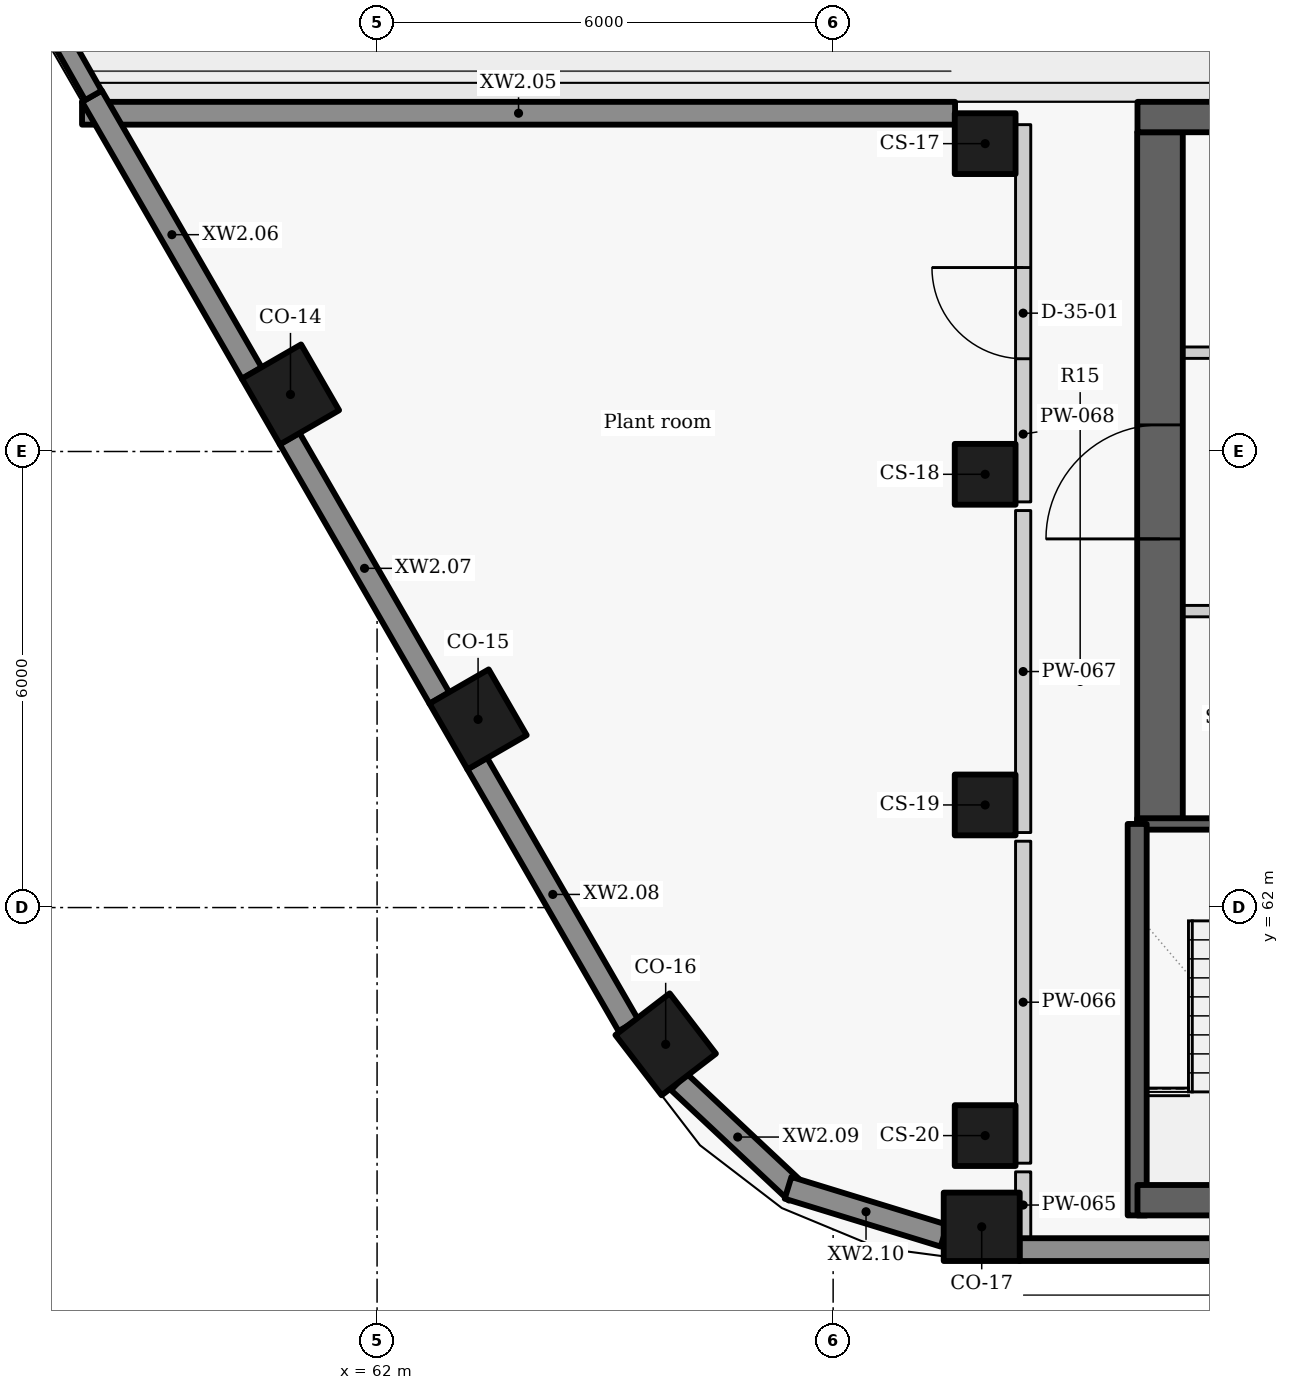
"""IFC4 building model, lengths in metres.
Left out: names, types, materials, properties, quantities, classifications, styles, units other than length and angle.
Written with IfcOpenShell. Run it as: python <this file> out.ifc"""

import sys

from ifc_helpers import new_model, si_unit, direction, frame, frame_2d, origin, origin_2d, place, context, subcontext, project, spatial, rectangle, extrude, element, fill, save


model = new_model("IFC4")
c1 = context("Model", 3, precision=1e-05, world=origin(), true_north=direction((0.0, 1.0)))
c2 = subcontext(c1, "Body", "Model", "MODEL_VIEW")
j1 = project(units=[si_unit("LENGTHUNIT", "METRE"), si_unit("PLANEANGLEUNIT", "RADIAN")], contexts=[c1])
p1 = place(None, origin())
s1 = spatial("IfcSite", under=j1, at=p1, CompositionType="ELEMENT")
p2 = place(p1, origin())
s2 = spatial("IfcBuilding", under=s1, at=p2, CompositionType="ELEMENT")
p3 = place(p2, frame((0.0, 0.0, 276.0)))
s3 = spatial("IfcBuildingStorey", under=s2, at=p3, CompositionType="ELEMENT", Elevation=276.0)
for number, where, z_axis, x_axis in (
    (1, (60.861, 68.75, 0.0), (0.0, 0.0, 1.0), (0.5, -0.866, 0.0)),
    (2, (63.329, 64.475, 0.0), (0.0, 0.0, 1.0), (0.5, -0.866, 0.0)),
    (3, (65.797, 60.2, 0.0), (0.0, 0.0, 1.0), (0.609, -0.793, 0.0)),
    (4, (69.955, 57.8, 0.0), (0.0, 0.0, 1.0), (1.0, 0.0, 0.0)),
):
    element("IfcColumn", number, at=place(p3, frame(where, z_axis=z_axis, x_axis=x_axis)), inside=s3, PredefinedType="COLUMN", context=c2, shape_type="SweptSolid", body=[
        extrude(rectangle(XDim=1.0, YDim=0.9, at=origin_2d()), origin(), (0.0, 0.0, 1.0), 3.6),
    ])
for number, where, z_axis, x_axis in (
    (5, (70.0, 72.05, 0.0), (0.0, 0.0, 1.0), (0.0, -1.0, 0.0)),
    (6, (70.0, 67.7, 0.0), (0.0, 0.0, 1.0), (0.0, -1.0, 0.0)),
    (7, (70.0, 63.35, 0.0), (0.0, 0.0, 1.0), (0.0, -1.0, 0.0)),
    (8, (70.0, 59.0, 0.0), (0.0, 0.0, 1.0), (0.0, -1.0, 0.0)),
):
    element("IfcColumn", number, at=place(p3, frame(where, z_axis=z_axis, x_axis=x_axis)), inside=s3, PredefinedType="COLUMN", context=c2, shape_type="SweptSolid", body=[
        extrude(rectangle(XDim=0.8, YDim=0.8, at=origin_2d()), origin(), (0.0, 0.0, 1.0), 3.6),
    ])
p4 = place(p3, frame((69.604, 72.45, 0.0), z_axis=(0.0, 0.0, 1.0), x_axis=(-1.0, 0.0, 0.0)))
e9 = element("IfcWall", 9, at=p4, inside=s3, PredefinedType="SOLIDWALL", context=c2, shape_type="SweptSolid", body=[
    extrude(rectangle(XDim=11.486, YDim=0.3, at=frame_2d((5.743, 0.0))), origin(), (0.0, 0.0, 1.0), 2.725),
])
p5 = place(p3, frame((58.248, 72.675, 0.0), z_axis=(0.0, 0.0, 1.0), x_axis=(0.499981865284, -0.866035873614, 0.0)))
e10 = element("IfcWall", 10, at=p5, inside=s3, PredefinedType="SOLIDWALL", context=c2, shape_type="SweptSolid", body=[
    extrude(rectangle(XDim=4.209, YDim=0.3, at=frame_2d((2.104, 0.0))), origin(), (0.0, 0.0, 1.0), 2.725),
])
p6 = place(p3, frame((60.849, 68.171, 0.0), z_axis=(0.0, 0.0, 1.0), x_axis=(0.499986771468, -0.866033041146, 0.0)))
e11 = element("IfcWall", 11, at=p6, inside=s3, PredefinedType="SOLIDWALL", context=c2, shape_type="SweptSolid", body=[
    extrude(rectangle(XDim=3.944, YDim=0.3, at=frame_2d((1.972, 0.0))), origin(), (0.0, 0.0, 1.0), 2.725),
])
p7 = place(p3, frame((63.317, 63.896, 0.0), z_axis=(0.0, 0.0, 1.0), x_axis=(0.500005687176, -0.866022120267, 0.0)))
e12 = element("IfcWall", 12, at=p7, inside=s3, PredefinedType="SOLIDWALL", context=c2, shape_type="SweptSolid", body=[
    extrude(rectangle(XDim=3.979, YDim=0.3, at=frame_2d((1.99, 0.0))), origin(), (0.0, 0.0, 1.0), 2.725),
])
p8 = place(p3, frame((65.97, 59.708, 0.0), z_axis=(0.0, 0.0, 1.0), x_axis=(0.72926487109, -0.684231501609, 0.0)))
e13 = element("IfcWall", 13, at=p8, inside=s3, PredefinedType="SOLIDWALL", context=c2, shape_type="SweptSolid", body=[
    extrude(rectangle(XDim=2.125, YDim=0.3, at=frame_2d((1.062, 0.0))), origin(), (0.0, 0.0, 1.0), 2.725),
])
p9 = place(p3, frame((67.407, 58.313, 0.0), z_axis=(0.0, 0.0, 1.0), x_axis=(0.955955937739, -0.293510212944, 0.0)))
e14 = element("IfcWall", 14, at=p9, inside=s3, PredefinedType="SOLIDWALL", context=c2, shape_type="SweptSolid", body=[
    extrude(rectangle(XDim=2.146, YDim=0.3, at=frame_2d((1.073, 0.0))), origin(), (0.0, 0.0, 1.0), 2.725),
])
p10 = place(p3, frame((70.451, 57.5, 0.0), z_axis=(0.0, 0.0, 1.0), x_axis=(1.0, 0.0, 0.0)))
e15 = element("IfcWall", 15, at=p10, inside=s3, PredefinedType="SOLIDWALL", context=c2, shape_type="SweptSolid", body=[
    extrude(rectangle(XDim=19.093, YDim=0.3, at=frame_2d((9.546, 0.0))), origin(), (0.0, 0.0, 1.0), 2.725),
])
p11 = place(p3, frame((55.351, 77.834, 0.0), z_axis=(0.0, 0.0, 1.0), x_axis=(0.492736734633, -0.870178435922, 0.0)))
e16 = element("IfcWall", 16, at=p11, inside=s3, PredefinedType="PARAPET", context=c2, shape_type="SweptSolid", body=[
    extrude(rectangle(XDim=5.918, YDim=0.25, at=frame_2d((2.959, 0.0))), origin(), (0.0, 0.0, 1.0), 1.1),
])
p12 = place(p3, frame((72.0, 69.3, 0.0), z_axis=(0.0, 0.0, 1.0), x_axis=(1.0, 0.0, 0.0)))
e17 = element("IfcWall", 17, at=p12, inside=s3, PredefinedType="PARTITIONING", context=c2, shape_type="SweptSolid", body=[
    extrude(rectangle(XDim=13.4, YDim=0.15, at=frame_2d((6.7, 0.0))), origin(), (0.0, 0.0, 1.0), 3.325),
])
p13 = place(p12, frame((1.175, 0.0, 0.0)))
e18 = element("IfcOpeningElement", 18, at=p13, cuts=e17, PredefinedType="OPENING", context=c2, shape_type="SweptSolid", body=[
    extrude(rectangle(XDim=0.9, YDim=2.1, at=frame_2d((0.45, 1.05))), frame((0.0, 0.085, 0.0), z_axis=(0.0, -1.0, 0.0), x_axis=(1.0, 0.0, 0.0)), (0.0, 0.0, 1.0), 0.17),
])
p14 = place(p12, frame((3.5, 0.0, 0.0)))
e19 = element("IfcOpeningElement", 19, at=p14, cuts=e17, PredefinedType="OPENING", context=c2, shape_type="SweptSolid", body=[
    extrude(rectangle(XDim=0.9, YDim=2.1, at=frame_2d((0.45, 1.05))), frame((0.0, 0.085, 0.0), z_axis=(0.0, -1.0, 0.0), x_axis=(1.0, 0.0, 0.0)), (0.0, 0.0, 1.0), 0.17),
])
p15 = place(p12, frame((6.2, 0.0, 0.0)))
e20 = element("IfcOpeningElement", 20, at=p15, cuts=e17, PredefinedType="OPENING", context=c2, shape_type="SweptSolid", body=[
    extrude(rectangle(XDim=0.9, YDim=2.1, at=frame_2d((0.45, 1.05))), frame((0.0, 0.085, 0.0), z_axis=(0.0, -1.0, 0.0), x_axis=(1.0, 0.0, 0.0)), (0.0, 0.0, 1.0), 0.17),
])
p16 = place(p12, frame((8.9, 0.0, 0.0)))
e21 = element("IfcOpeningElement", 21, at=p16, cuts=e17, PredefinedType="OPENING", context=c2, shape_type="SweptSolid", body=[
    extrude(rectangle(XDim=0.9, YDim=2.1, at=frame_2d((0.45, 1.05))), frame((0.0, 0.085, 0.0), z_axis=(0.0, -1.0, 0.0), x_axis=(1.0, 0.0, 0.0)), (0.0, 0.0, 1.0), 0.17),
])
p17 = place(p12, frame((11.6, 0.0, 0.0)))
e22 = element("IfcOpeningElement", 22, at=p17, cuts=e17, PredefinedType="OPENING", context=c2, shape_type="SweptSolid", body=[
    extrude(rectangle(XDim=0.9, YDim=2.1, at=frame_2d((0.45, 1.05))), frame((0.0, 0.085, 0.0), z_axis=(0.0, -1.0, 0.0), x_axis=(1.0, 0.0, 0.0)), (0.0, 0.0, 1.0), 0.17),
])
p18 = place(p3, frame((72.3, 63.1, -0.275), z_axis=(0.0, 0.0, 1.0), x_axis=(0.0, 1.0, 0.0)))
e23 = element("IfcWall", 23, at=p18, inside=s3, PredefinedType="SHEAR", context=c2, shape_type="SweptSolid", body=[
    extrude(rectangle(XDim=9.1, YDim=0.6, at=frame_2d((4.55, 0.0))), origin(), (0.0, 0.0, 1.0), 3.6),
])
p19 = place(p18, frame((3.75, 0.0, 0.275)))
e24 = element("IfcOpeningElement", 24, at=p19, cuts=e23, PredefinedType="OPENING", context=c2, shape_type="SweptSolid", body=[
    extrude(rectangle(XDim=1.5, YDim=2.1, at=frame_2d((0.75, 1.05))), frame((0.0, 0.31, 0.0), z_axis=(0.0, -1.0, 0.0), x_axis=(1.0, 0.0, 0.0)), (0.0, 0.0, 1.0), 0.62),
])
p20 = place(p3, frame((82.703, 65.9, 0.0), z_axis=(0.0, 0.0, 1.0), x_axis=(-1.0, 0.0, 0.0)))
e25 = element("IfcWall", 25, at=p20, inside=s3, PredefinedType="PARTITIONING", context=c2, shape_type="SweptSolid", body=[
    extrude(rectangle(XDim=10.703, YDim=0.15, at=frame_2d((5.352, 0.0))), origin(), (0.0, 0.0, 1.0), 3.325),
])
p21 = place(p20, frame((8.528, 0.0, 0.0)))
e26 = element("IfcOpeningElement", 26, at=p21, cuts=e25, PredefinedType="OPENING", context=c2, shape_type="SweptSolid", body=[
    extrude(rectangle(XDim=1.1, YDim=2.1, at=frame_2d((0.55, 1.05))), frame((0.0, 0.085, 0.0), z_axis=(0.0, -1.0, 0.0), x_axis=(1.0, 0.0, 0.0)), (0.0, 0.0, 1.0), 0.17),
])
p22 = place(p20, frame((6.303, 0.0, 0.0)))
e27 = element("IfcOpeningElement", 27, at=p22, cuts=e25, PredefinedType="OPENING", context=c2, shape_type="SweptSolid", body=[
    extrude(rectangle(XDim=0.9, YDim=2.1, at=frame_2d((0.45, 1.05))), frame((0.0, 0.085, 0.0), z_axis=(0.0, -1.0, 0.0), x_axis=(1.0, 0.0, 0.0)), (0.0, 0.0, 1.0), 0.17),
])
p23 = place(p20, frame((3.453, 0.0, 0.0)))
e28 = element("IfcOpeningElement", 28, at=p23, cuts=e25, PredefinedType="OPENING", context=c2, shape_type="SweptSolid", body=[
    extrude(rectangle(XDim=1.2, YDim=2.1, at=frame_2d((0.6, 1.05))), frame((0.0, 0.085, 0.0), z_axis=(0.0, -1.0, 0.0), x_axis=(1.0, 0.0, 0.0)), (0.0, 0.0, 1.0), 0.17),
])
p24 = place(p20, frame((0.903, 0.0, 0.0)))
e29 = element("IfcOpeningElement", 29, at=p24, cuts=e25, PredefinedType="OPENING", context=c2, shape_type="SweptSolid", body=[
    extrude(rectangle(XDim=0.9, YDim=2.1, at=frame_2d((0.45, 1.05))), frame((0.0, 0.085, 0.0), z_axis=(0.0, -1.0, 0.0), x_axis=(1.0, 0.0, 0.0)), (0.0, 0.0, 1.0), 0.17),
])
p25 = place(p3, frame((72.0, 63.1, -0.275), z_axis=(0.0, 0.0, 1.0), x_axis=(1.0, 0.0, 0.0)))
e30 = element("IfcWall", 30, at=p25, inside=s3, PredefinedType="SHEAR", context=c2, shape_type="SweptSolid", body=[
    extrude(rectangle(XDim=2.6, YDim=0.15, at=frame_2d((1.3, 0.0))), origin(), (0.0, 0.0, 1.0), 3.6),
])
p26 = place(p25, frame((1.02, 0.0, 0.275)))
e31 = element("IfcOpeningElement", 31, at=p26, cuts=e30, PredefinedType="OPENING", context=c2, shape_type="SweptSolid", body=[
    extrude(rectangle(XDim=1.1, YDim=2.1, at=frame_2d((0.55, 1.05))), frame((0.0, 0.085, 0.0), z_axis=(0.0, -1.0, 0.0), x_axis=(1.0, 0.0, 0.0)), (0.0, 0.0, 1.0), 0.17),
])
p27 = place(p3, frame((72.0, 57.95, -0.275), z_axis=(0.0, 0.0, 1.0), x_axis=(0.0, 1.0, 0.0)))
e32 = element("IfcWall", 32, at=p27, inside=s3, PredefinedType="SHEAR", context=c2, shape_type="SweptSolid", body=[
    extrude(rectangle(XDim=5.15, YDim=0.25, at=frame_2d((2.575, 0.0))), origin(), (0.0, 0.0, 1.0), 3.6),
])
p28 = place(p3, frame((70.5, 57.65, 0.0), z_axis=(0.0, 0.0, 1.0), x_axis=(0.0, 1.0, 0.0)))
e33 = element("IfcWall", 33, at=p28, inside=s3, PredefinedType="PARTITIONING", context=c2, shape_type="SweptSolid", body=[
    extrude(rectangle(XDim=0.873, YDim=0.2, at=frame_2d((0.437, 0.0))), origin(), (0.0, 0.0, 1.0), 3.325),
])
p29 = place(p3, frame((70.5, 58.637, 0.0), z_axis=(0.0, 0.0, 1.0), x_axis=(0.0, 1.0, 0.0)))
e34 = element("IfcWall", 34, at=p29, inside=s3, PredefinedType="PARTITIONING", context=c2, shape_type="SweptSolid", body=[
    extrude(rectangle(XDim=4.236, YDim=0.2, at=frame_2d((2.118, 0.0))), origin(), (0.0, 0.0, 1.0), 3.325),
])
p30 = place(p3, frame((70.5, 62.987, 0.0), z_axis=(0.0, 0.0, 1.0), x_axis=(0.0, 1.0, 0.0)))
e35 = element("IfcWall", 35, at=p30, inside=s3, PredefinedType="PARTITIONING", context=c2, shape_type="SweptSolid", body=[
    extrude(rectangle(XDim=4.236, YDim=0.2, at=frame_2d((2.118, 0.0))), origin(), (0.0, 0.0, 1.0), 3.325),
])
p31 = place(p3, frame((70.5, 67.337, 0.0), z_axis=(0.0, 0.0, 1.0), x_axis=(0.0, 1.0, 0.0)))
e36 = element("IfcWall", 36, at=p31, inside=s3, PredefinedType="PARTITIONING", context=c2, shape_type="SweptSolid", body=[
    extrude(rectangle(XDim=4.963, YDim=0.2, at=frame_2d((2.481, 0.0))), origin(), (0.0, 0.0, 1.0), 3.325),
])
p32 = place(p31, frame((1.883, 0.0, 0.0)))
e37 = element("IfcOpeningElement", 37, at=p32, cuts=e36, PredefinedType="OPENING", context=c2, shape_type="SweptSolid", body=[
    extrude(rectangle(XDim=1.2, YDim=2.1, at=frame_2d((0.6, 1.05))), frame((0.0, 0.11, 0.0), z_axis=(0.0, -1.0, 0.0), x_axis=(1.0, 0.0, 0.0)), (0.0, 0.0, 1.0), 0.22),
])
p33 = place(p3, frame((72.004, 72.4, -0.275), z_axis=(0.0, 0.0, 1.0), x_axis=(1.0, 0.0, 0.0)))
e38 = element("IfcWall", 38, at=p33, inside=s3, PredefinedType="SHEAR", context=c2, shape_type="SweptSolid", body=[
    extrude(rectangle(XDim=13.396, YDim=0.4, at=frame_2d((6.698, 0.0))), origin(), (0.0, 0.0, 1.0), 3.6),
])
p34 = place(p3, frame((72.004, 58.15, -0.275), z_axis=(0.0, 0.0, 1.0), x_axis=(1.0, 0.0, 0.0)))
e39 = element("IfcWall", 39, at=p34, inside=s3, PredefinedType="SHEAR", context=c2, shape_type="SweptSolid", body=[
    extrude(rectangle(XDim=15.992, YDim=0.4, at=frame_2d((7.996, 0.0))), origin(), (0.0, 0.0, 1.0), 3.6),
])
p35 = place(p32, origin())
e40 = element("IfcDoor", 40, at=p35, inside=s3, OperationType="SINGLE_SWING_RIGHT", PredefinedType="DOOR", context=c2, shape_type="SweptSolid", body=[
    extrude(rectangle(XDim=1.2, YDim=2.1, at=frame_2d((0.6, 1.05))), frame((0.0, 0.025, 0.0), z_axis=(0.0, -1.0, 0.0), x_axis=(1.0, 0.0, 0.0)), (0.0, 0.0, 1.0), 0.05),
])
fill(e37, e40)
p36 = place(p19, origin())
e41 = element("IfcDoor", 41, at=p36, inside=s3, OperationType="DOUBLE_DOOR_SINGLE_SWING", PredefinedType="DOOR", context=c2, shape_type="SweptSolid", body=[
    extrude(rectangle(XDim=1.5, YDim=2.1, at=frame_2d((0.75, 1.05))), frame((0.0, 0.025, 0.0), z_axis=(0.0, -1.0, 0.0), x_axis=(1.0, 0.0, 0.0)), (0.0, 0.0, 1.0), 0.05),
])
fill(e24, e41)
save(model, sys.argv[1])
